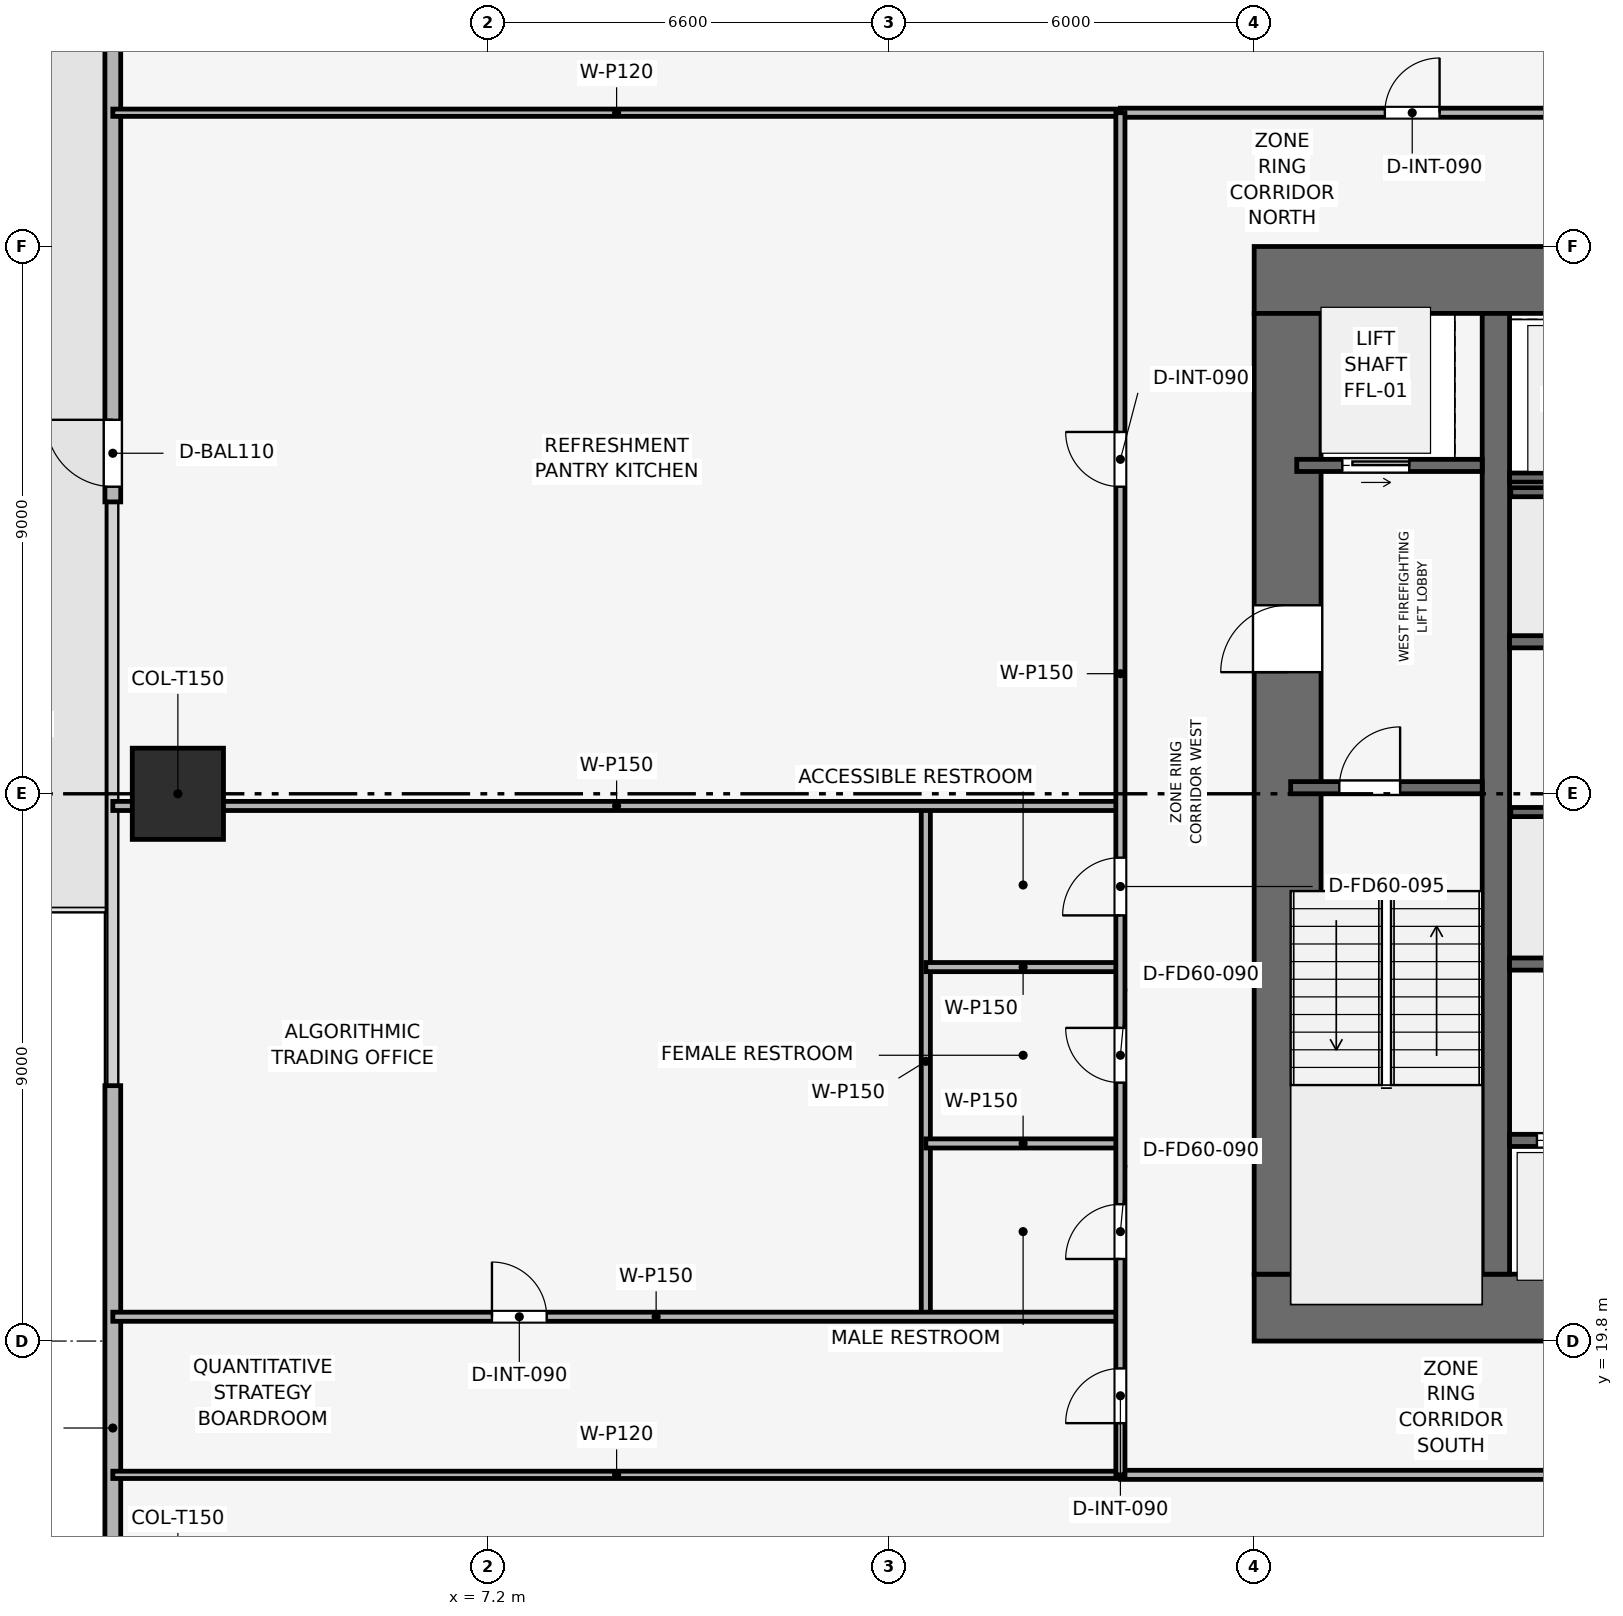
"""IFC4 building model, lengths in metres.
Left out: names, types, materials, properties, quantities, classifications, styles, units other than length and angle.
Written with IfcOpenShell. Run it as: python <this file> out.ifc"""

import sys

from ifc_helpers import new_model, si_unit, direction, frame, frame_2d, origin, origin_2d, place, context, subcontext, project, spatial, rectangle, extrude, element, fill, save


model = new_model("IFC4")
c1 = context("Model", 3, precision=1e-05, world=origin(), true_north=direction((0.0, 1.0)))
c2 = subcontext(c1, "Body", "Model", "MODEL_VIEW")
j1 = project(units=[si_unit("LENGTHUNIT", "METRE"), si_unit("PLANEANGLEUNIT", "RADIAN")], contexts=[c1])
p1 = place(None, origin())
s1 = spatial("IfcSite", under=j1, at=p1, CompositionType="ELEMENT")
p2 = place(p1, origin())
s2 = spatial("IfcBuilding", under=s1, at=p2, CompositionType="ELEMENT")
p3 = place(p2, frame((0.0, 0.0, 30.0)))
s3 = spatial("IfcBuildingStorey", under=s2, at=p3, CompositionType="ELEMENT", Elevation=30.0)
p4 = place(p3, frame((19.8, 20.35, 0.0), z_axis=(0.0, 0.0, 1.0), x_axis=(1.0, 0.0, 0.0)))
e1 = element("IfcWall", 1, at=p4, inside=s3, PredefinedType="SHEAR", context=c2, shape_type="SweptSolid", body=[
    extrude(rectangle(XDim=18.0, YDim=1.1, at=frame_2d((9.0, 0.0))), origin(), (0.0, 0.0, 1.0), 3.9),
])
p5 = place(p4, frame((8.4, 0.0, 0.0)))
e2 = element("IfcOpeningElement", 2, at=p5, cuts=e1, PredefinedType="OPENING", context=c2, shape_type="SweptSolid", body=[
    extrude(rectangle(XDim=1.2, YDim=2.2, at=frame_2d((0.6, 1.1))), frame((0.0, 0.56, 0.0), z_axis=(0.0, -1.0, 0.0), x_axis=(1.0, 0.0, 0.0)), (0.0, 0.0, 1.0), 1.12),
])
p6 = place(p3, frame((19.8, 37.25, 0.0), z_axis=(0.0, 0.0, 1.0), x_axis=(1.0, 0.0, 0.0)))
e3 = element("IfcWall", 3, at=p6, inside=s3, PredefinedType="SHEAR", context=c2, shape_type="SweptSolid", body=[
    extrude(rectangle(XDim=18.0, YDim=1.1, at=frame_2d((9.0, 0.0))), origin(), (0.0, 0.0, 1.0), 3.9),
])
p7 = place(p6, frame((7.05, 0.0, 0.0)))
e4 = element("IfcOpeningElement", 4, at=p7, cuts=e3, PredefinedType="OPENING", context=c2, shape_type="SweptSolid", body=[
    extrude(rectangle(XDim=1.1, YDim=2.15, at=frame_2d((0.55, 1.075))), frame((0.0, 0.56, 0.0), z_axis=(0.0, -1.0, 0.0), x_axis=(1.0, 0.0, 0.0)), (0.0, 0.0, 1.0), 1.12),
])
p8 = place(p3, frame((20.35, 20.9, 0.0), z_axis=(0.0, 0.0, 1.0), x_axis=(0.0, 1.0, 0.0)))
e5 = element("IfcWall", 5, at=p8, inside=s3, PredefinedType="SHEAR", context=c2, shape_type="SweptSolid", body=[
    extrude(rectangle(XDim=15.8, YDim=1.1, at=frame_2d((7.9, 0.0))), origin(), (0.0, 0.0, 1.0), 3.9),
])
p9 = place(p8, frame((9.9, 0.0, 0.0)))
e6 = element("IfcOpeningElement", 6, at=p9, cuts=e5, PredefinedType="OPENING", context=c2, shape_type="SweptSolid", body=[
    extrude(rectangle(XDim=1.1, YDim=2.15, at=frame_2d((0.55, 1.075))), frame((0.0, 0.56, 0.0), z_axis=(0.0, -1.0, 0.0), x_axis=(1.0, 0.0, 0.0)), (0.0, 0.0, 1.0), 1.12),
])
p10 = place(p3, frame((23.775, 20.9, 0.0), z_axis=(0.0, 0.0, 1.0), x_axis=(0.0, 1.0, 0.0)))
e7 = element("IfcWall", 7, at=p10, inside=s3, PredefinedType="SHEAR", context=c2, shape_type="SweptSolid", body=[
    extrude(rectangle(XDim=15.8, YDim=0.45, at=frame_2d((7.9, 0.0))), origin(), (0.0, 0.0, 1.0), 3.9),
])
p11 = place(p3, frame((2.1, 28.8, 0.003), z_axis=(0.0, 0.0, 1.0), x_axis=(1.0, 0.0, 0.0)))
e8 = element("IfcColumn", 8, at=p11, inside=s3, PredefinedType="COLUMN", context=c2, shape_type="SweptSolid", body=[
    extrude(rectangle(XDim=1.5, YDim=1.5, at=origin_2d()), origin(), (0.0, 0.0, 1.0), 3.644),
])
p12 = place(p3, frame((1.03, 8.7, 0.0), z_axis=(0.0, 0.0, 1.0), x_axis=(0.0, 1.0, 0.0)))
e9 = element("IfcWall", 9, at=p12, inside=s3, PredefinedType="SOLIDWALL", context=c2, shape_type="SweptSolid", body=[
    extrude(rectangle(XDim=15.3, YDim=0.26, at=frame_2d((7.65, 0.0))), origin(), (0.0, 0.0, 1.0), 3.65),
])
p13 = place(p12, frame((0.25, 0.0, 0.9)))
e10 = element("IfcOpeningElement", 10, at=p13, cuts=e9, PredefinedType="OPENING", context=c2, shape_type="SweptSolid", body=[
    extrude(rectangle(XDim=3.8, YDim=1.9, at=frame_2d((1.9, 0.95))), frame((0.0, 0.14, 0.0), z_axis=(0.0, -1.0, 0.0), x_axis=(1.0, 0.0, 0.0)), (0.0, 0.0, 1.0), 0.28),
])
p14 = place(p3, frame((1.03, 33.6, 0.0), z_axis=(0.0, 0.0, 1.0), x_axis=(0.0, 1.0, 0.0)))
e11 = element("IfcWall", 11, at=p14, inside=s3, PredefinedType="SOLIDWALL", context=c2, shape_type="SweptSolid", body=[
    extrude(rectangle(XDim=15.3, YDim=0.26, at=frame_2d((7.65, 0.0))), origin(), (0.0, 0.0, 1.0), 3.65),
])
p15 = place(p14, frame((0.25, 0.0, 0.0)))
e12 = element("IfcOpeningElement", 12, at=p15, cuts=e11, PredefinedType="OPENING", context=c2, shape_type="SweptSolid", body=[
    extrude(rectangle(XDim=1.1, YDim=2.2, at=frame_2d((0.55, 1.1))), frame((0.0, 0.14, 0.0), z_axis=(0.0, -1.0, 0.0), x_axis=(1.0, 0.0, 0.0)), (0.0, 0.0, 1.0), 0.28),
])
p16 = place(p3, frame((20.4, 28.9, 0.0), z_axis=(0.0, 0.0, 1.0), x_axis=(1.0, 0.0, 0.0)))
e13 = element("IfcWall", 13, at=p16, inside=s3, PredefinedType="SHEAR", context=c2, shape_type="SweptSolid", body=[
    extrude(rectangle(XDim=3.15, YDim=0.2, at=frame_2d((1.575, 0.0))), origin(), (0.0, 0.0, 1.0), 3.65),
])
p17 = place(p16, frame((0.8, 0.0, 0.0)))
e14 = element("IfcOpeningElement", 14, at=p17, cuts=e13, PredefinedType="OPENING", context=c2, shape_type="SweptSolid", body=[
    extrude(rectangle(XDim=1.0, YDim=2.1, at=frame_2d((0.5, 1.05))), frame((0.0, 0.11, 0.0), z_axis=(0.0, -1.0, 0.0), x_axis=(1.0, 0.0, 0.0)), (0.0, 0.0, 1.0), 0.22),
])
p18 = place(p3, frame((20.5, 34.2, 0.0), z_axis=(0.0, 0.0, 1.0), x_axis=(1.0, 0.0, 0.0)))
e15 = element("IfcWall", 15, at=p18, inside=s3, PredefinedType="SHEAR", context=c2, shape_type="SweptSolid", body=[
    extrude(rectangle(XDim=3.05, YDim=0.2, at=frame_2d((1.525, 0.0))), origin(), (0.0, 0.0, 1.0), 3.65),
])
p19 = place(p18, frame((0.75, 0.0, 0.0)))
e16 = element("IfcOpeningElement", 16, at=p19, cuts=e15, PredefinedType="OPENING", context=c2, shape_type="SweptSolid", body=[
    extrude(rectangle(XDim=1.1, YDim=2.15, at=frame_2d((0.55, 1.075))), frame((0.0, 0.11, 0.0), z_axis=(0.0, -1.0, 0.0), x_axis=(1.0, 0.0, 0.0)), (0.0, 0.0, 1.0), 0.22),
])
p20 = place(p3, frame((24.0, 34.0, 0.0), z_axis=(0.0, 0.0, 1.0), x_axis=(1.0, 0.0, 0.0)))
e17 = element("IfcWall", 17, at=p20, inside=s3, PredefinedType="SHEAR", context=c2, shape_type="SweptSolid", body=[
    extrude(rectangle(XDim=2.48, YDim=0.15, at=frame_2d((1.24, 0.0))), origin(), (0.0, 0.0, 1.0), 3.65),
])
p21 = place(p3, frame((24.0, 23.1, 0.0), z_axis=(0.0, 0.0, 1.0), x_axis=(1.0, 0.0, 0.0)))
e18 = element("IfcWall", 18, at=p21, inside=s3, PredefinedType="SHEAR", context=c2, shape_type="SweptSolid", body=[
    extrude(rectangle(XDim=2.0, YDim=0.2, at=frame_2d((1.0, 0.0))), origin(), (0.0, 0.0, 1.0), 3.65),
])
p22 = place(p21, frame((0.45, 0.0, 0.0)))
e19 = element("IfcOpeningElement", 19, at=p22, cuts=e18, PredefinedType="OPENING", context=c2, shape_type="SweptSolid", body=[
    extrude(rectangle(XDim=1.1, YDim=2.15, at=frame_2d((0.55, 1.075))), frame((0.0, 0.11, 0.0), z_axis=(0.0, -1.0, 0.0), x_axis=(1.0, 0.0, 0.0)), (0.0, 0.0, 1.0), 0.22),
])
for number, where, z_axis, x_axis in (
    (20, (24.0, 26.0, 0.0), (0.0, 0.0, 1.0), (1.0, 0.0, 0.0)),
    (21, (24.0, 31.3, 0.0), (0.0, 0.0, 1.0), (1.0, 0.0, 0.0)),
):
    element("IfcWall", number, at=place(p3, frame(where, z_axis=z_axis, x_axis=x_axis)), inside=s3, PredefinedType="SHEAR", context=c2, shape_type="SweptSolid", body=[
        extrude(rectangle(XDim=2.0, YDim=0.2, at=frame_2d((1.0, 0.0))), origin(), (0.0, 0.0, 1.0), 3.65),
    ])
for number, where, z_axis, x_axis in (
    (22, (24.02, 28.5, 0.0), (0.0, 0.0, 1.0), (1.0, 0.0, 0.0)),
    (23, (24.02, 33.76, 0.0), (0.0, 0.0, 1.0), (1.0, 0.0, 0.0)),
):
    element("IfcWall", number, at=place(p3, frame(where, z_axis=z_axis, x_axis=x_axis)), inside=s3, PredefinedType="SHEAR", context=c2, shape_type="SweptSolid", body=[
        extrude(rectangle(XDim=4.08, YDim=0.15, at=frame_2d((2.04, 0.0))), origin(), (0.0, 0.0, 1.0), 3.65),
    ])
for number, where, z_axis, x_axis in (
    (24, (1.03, 17.6, 0.0), (0.0, 0.0, 1.0), (1.0, 0.0, 0.0)),
    (25, (1.03, 40.0, 0.0), (0.0, 0.0, 1.0), (1.0, 0.0, 0.0)),
):
    element("IfcWall", number, at=place(p3, frame(where, z_axis=z_axis, x_axis=x_axis)), inside=s3, PredefinedType="PARTITIONING", context=c2, shape_type="SweptSolid", body=[
        extrude(rectangle(XDim=16.57, YDim=0.12, at=frame_2d((8.285, 0.0))), origin(), (0.0, 0.0, 1.0), 2.935),
    ])
p23 = place(p3, frame((14.4, 20.2, 0.0), z_axis=(0.0, 0.0, 1.0), x_axis=(0.0, 1.0, 0.0)))
e26 = element("IfcWall", 26, at=p23, inside=s3, PredefinedType="PARTITIONING", context=c2, shape_type="SweptSolid", body=[
    extrude(rectangle(XDim=8.4, YDim=0.15, at=frame_2d((4.2, 0.0))), origin(), (0.0, 0.0, 1.0), 3.085),
])
p24 = place(p3, frame((1.03, 20.2, 0.0), z_axis=(0.0, 0.0, 1.0), x_axis=(1.0, 0.0, 0.0)))
e27 = element("IfcWall", 27, at=p24, inside=s3, PredefinedType="PARTITIONING", context=c2, shape_type="SweptSolid", body=[
    extrude(rectangle(XDim=16.57, YDim=0.15, at=frame_2d((8.285, 0.0))), origin(), (0.0, 0.0, 1.0), 2.935),
])
p25 = place(p24, frame((6.235, 0.0, 0.0)))
e28 = element("IfcOpeningElement", 28, at=p25, cuts=e27, PredefinedType="OPENING", context=c2, shape_type="SweptSolid", body=[
    extrude(rectangle(XDim=0.9, YDim=2.1, at=frame_2d((0.45, 1.05))), frame((0.0, 0.085, 0.0), z_axis=(0.0, -1.0, 0.0), x_axis=(1.0, 0.0, 0.0)), (0.0, 0.0, 1.0), 0.17),
])
p26 = place(p3, frame((1.03, 28.6, 0.0), z_axis=(0.0, 0.0, 1.0), x_axis=(1.0, 0.0, 0.0)))
e29 = element("IfcWall", 29, at=p26, inside=s3, PredefinedType="PARTITIONING", context=c2, shape_type="SweptSolid", body=[
    extrude(rectangle(XDim=16.57, YDim=0.15, at=frame_2d((8.285, 0.0))), origin(), (0.0, 0.0, 1.0), 2.935),
])
for number, where, z_axis, x_axis in (
    (30, (14.4, 23.05, 0.0), (0.0, 0.0, 1.0), (1.0, 0.0, 0.0)),
    (31, (14.4, 25.95, 0.0), (0.0, 0.0, 1.0), (1.0, 0.0, 0.0)),
):
    element("IfcWall", number, at=place(p3, frame(where, z_axis=z_axis, x_axis=x_axis)), inside=s3, PredefinedType="PARTITIONING", context=c2, shape_type="SweptSolid", body=[
        extrude(rectangle(XDim=3.2, YDim=0.15, at=frame_2d((1.6, 0.0))), origin(), (0.0, 0.0, 1.0), 3.65),
    ])
p27 = place(p3, frame((17.6, 17.6, 0.0), z_axis=(0.0, 0.0, 1.0), x_axis=(1.0, 0.0, 0.0)))
e32 = element("IfcWall", 32, at=p27, inside=s3, PredefinedType="PARTITIONING", context=c2, shape_type="SweptSolid", body=[
    extrude(rectangle(XDim=22.4, YDim=0.15, at=frame_2d((11.2, 0.0))), origin(), (0.0, 0.0, 1.0), 3.085),
])
p28 = place(p27, frame((10.75, 0.0, 0.0)))
e33 = element("IfcOpeningElement", 33, at=p28, cuts=e32, PredefinedType="OPENING", context=c2, shape_type="SweptSolid", body=[
    extrude(rectangle(XDim=0.9, YDim=2.1, at=frame_2d((0.45, 1.05))), frame((0.0, 0.085, 0.0), z_axis=(0.0, -1.0, 0.0), x_axis=(1.0, 0.0, 0.0)), (0.0, 0.0, 1.0), 0.17),
])
p29 = place(p3, frame((17.6, 40.0, 0.0), z_axis=(0.0, 0.0, 1.0), x_axis=(1.0, 0.0, 0.0)))
e34 = element("IfcWall", 34, at=p29, inside=s3, PredefinedType="PARTITIONING", context=c2, shape_type="SweptSolid", body=[
    extrude(rectangle(XDim=22.4, YDim=0.15, at=frame_2d((11.2, 0.0))), origin(), (0.0, 0.0, 1.0), 3.085),
])
p30 = place(p29, frame((4.349, 0.0, 0.0)))
e35 = element("IfcOpeningElement", 35, at=p30, cuts=e34, PredefinedType="OPENING", context=c2, shape_type="SweptSolid", body=[
    extrude(rectangle(XDim=0.9, YDim=2.1, at=frame_2d((0.45, 1.05))), frame((0.0, 0.085, 0.0), z_axis=(0.0, -1.0, 0.0), x_axis=(1.0, 0.0, 0.0)), (0.0, 0.0, 1.0), 0.17),
])
p31 = place(p29, frame((15.549, 0.0, 0.0)))
e36 = element("IfcOpeningElement", 36, at=p31, cuts=e34, PredefinedType="OPENING", context=c2, shape_type="SweptSolid", body=[
    extrude(rectangle(XDim=0.9, YDim=2.1, at=frame_2d((0.45, 1.05))), frame((0.0, 0.085, 0.0), z_axis=(0.0, -1.0, 0.0), x_axis=(1.0, 0.0, 0.0)), (0.0, 0.0, 1.0), 0.17),
])
p32 = place(p3, frame((17.6, 17.6, 0.0), z_axis=(0.0, 0.0, 1.0), x_axis=(0.0, 1.0, 0.0)))
e37 = element("IfcWall", 37, at=p32, inside=s3, PredefinedType="PARTITIONING", context=c2, shape_type="SweptSolid", body=[
    extrude(rectangle(XDim=22.4, YDim=0.15, at=frame_2d((11.2, 0.0))), origin(), (0.0, 0.0, 1.0), 3.085),
])
p33 = place(p32, frame((0.85, 0.0, 0.0)))
e38 = element("IfcOpeningElement", 38, at=p33, cuts=e37, PredefinedType="OPENING", context=c2, shape_type="SweptSolid", body=[
    extrude(rectangle(XDim=0.9, YDim=2.1, at=frame_2d((0.45, 1.05))), frame((0.0, 0.085, 0.0), z_axis=(0.0, -1.0, 0.0), x_axis=(1.0, 0.0, 0.0)), (0.0, 0.0, 1.0), 0.17),
])
p34 = place(p32, frame((3.55, 0.0, 0.0)))
e39 = element("IfcOpeningElement", 39, at=p34, cuts=e37, PredefinedType="OPENING", context=c2, shape_type="SweptSolid", body=[
    extrude(rectangle(XDim=0.9, YDim=2.1, at=frame_2d((0.45, 1.05))), frame((0.0, 0.085, 0.0), z_axis=(0.0, -1.0, 0.0), x_axis=(1.0, 0.0, 0.0)), (0.0, 0.0, 1.0), 0.17),
])
p35 = place(p32, frame((6.45, 0.0, 0.0)))
e40 = element("IfcOpeningElement", 40, at=p35, cuts=e37, PredefinedType="OPENING", context=c2, shape_type="SweptSolid", body=[
    extrude(rectangle(XDim=0.9, YDim=2.1, at=frame_2d((0.45, 1.05))), frame((0.0, 0.085, 0.0), z_axis=(0.0, -1.0, 0.0), x_axis=(1.0, 0.0, 0.0)), (0.0, 0.0, 1.0), 0.17),
])
p36 = place(p32, frame((9.2, 0.0, 0.0)))
e41 = element("IfcOpeningElement", 41, at=p36, cuts=e37, PredefinedType="OPENING", context=c2, shape_type="SweptSolid", body=[
    extrude(rectangle(XDim=0.95, YDim=2.1, at=frame_2d((0.475, 1.05))), frame((0.0, 0.085, 0.0), z_axis=(0.0, -1.0, 0.0), x_axis=(1.0, 0.0, 0.0)), (0.0, 0.0, 1.0), 0.17),
])
p37 = place(p32, frame((16.25, 0.0, 0.0)))
e42 = element("IfcOpeningElement", 42, at=p37, cuts=e37, PredefinedType="OPENING", context=c2, shape_type="SweptSolid", body=[
    extrude(rectangle(XDim=0.9, YDim=2.1, at=frame_2d((0.45, 1.05))), frame((0.0, 0.085, 0.0), z_axis=(0.0, -1.0, 0.0), x_axis=(1.0, 0.0, 0.0)), (0.0, 0.0, 1.0), 0.17),
])
p38 = place(p15, origin())
e43 = element("IfcDoor", 43, at=p38, inside=s3, OperationType="SINGLE_SWING_RIGHT", PredefinedType="DOOR", context=c2, shape_type="SweptSolid", body=[
    extrude(rectangle(XDim=1.1, YDim=2.2, at=frame_2d((0.55, 1.1))), frame((0.0, 0.025, 0.0), z_axis=(0.0, -1.0, 0.0), x_axis=(1.0, 0.0, 0.0)), (0.0, 0.0, 1.0), 0.05),
])
fill(e12, e43)
p39 = place(p17, origin())
e44 = element("IfcDoor", 44, at=p39, inside=s3, OperationType="SINGLE_SWING_RIGHT", PredefinedType="DOOR", context=c2, shape_type="SweptSolid", body=[
    extrude(rectangle(XDim=1.0, YDim=2.1, at=frame_2d((0.5, 1.05))), frame((0.0, 0.025, 0.0), z_axis=(0.0, -1.0, 0.0), x_axis=(1.0, 0.0, 0.0)), (0.0, 0.0, 1.0), 0.05),
])
fill(e14, e44)
p40 = place(p19, origin())
e45 = element("IfcDoor", 45, at=p40, inside=s3, OperationType="SLIDING_TO_RIGHT", PredefinedType="DOOR", context=c2, shape_type="SweptSolid", body=[
    extrude(rectangle(XDim=1.1, YDim=2.15, at=frame_2d((0.55, 1.075))), frame((0.0, 0.025, 0.0), z_axis=(0.0, -1.0, 0.0), x_axis=(1.0, 0.0, 0.0)), (0.0, 0.0, 1.0), 0.05),
])
fill(e16, e45)
p41 = place(p22, origin())
e46 = element("IfcDoor", 46, at=p41, inside=s3, OperationType="SLIDING_TO_RIGHT", PredefinedType="DOOR", context=c2, shape_type="SweptSolid", body=[
    extrude(rectangle(XDim=1.1, YDim=2.15, at=frame_2d((0.55, 1.075))), frame((0.0, 0.025, 0.0), z_axis=(0.0, -1.0, 0.0), x_axis=(1.0, 0.0, 0.0)), (0.0, 0.0, 1.0), 0.05),
])
fill(e19, e46)
p42 = place(p25, origin())
e47 = element("IfcDoor", 47, at=p42, inside=s3, OperationType="SINGLE_SWING_LEFT", PredefinedType="DOOR", context=c2, shape_type="SweptSolid", body=[
    extrude(rectangle(XDim=0.9, YDim=2.1, at=frame_2d((0.45, 1.05))), frame((0.0, 0.025, 0.0), z_axis=(0.0, -1.0, 0.0), x_axis=(1.0, 0.0, 0.0)), (0.0, 0.0, 1.0), 0.05),
])
fill(e28, e47)
p43 = place(p30, origin())
e48 = element("IfcDoor", 48, at=p43, inside=s3, OperationType="SINGLE_SWING_RIGHT", PredefinedType="DOOR", context=c2, shape_type="SweptSolid", body=[
    extrude(rectangle(XDim=0.9, YDim=2.1, at=frame_2d((0.45, 1.05))), frame((0.0, 0.025, 0.0), z_axis=(0.0, -1.0, 0.0), x_axis=(1.0, 0.0, 0.0)), (0.0, 0.0, 1.0), 0.05),
])
fill(e35, e48)
p44 = place(p33, origin())
e49 = element("IfcDoor", 49, at=p44, inside=s3, OperationType="SINGLE_SWING_LEFT", PredefinedType="DOOR", context=c2, shape_type="SweptSolid", body=[
    extrude(rectangle(XDim=0.9, YDim=2.1, at=frame_2d((0.45, 1.05))), frame((0.0, 0.025, 0.0), z_axis=(0.0, -1.0, 0.0), x_axis=(1.0, 0.0, 0.0)), (0.0, 0.0, 1.0), 0.05),
])
fill(e38, e49)
p45 = place(p34, origin())
e50 = element("IfcDoor", 50, at=p45, inside=s3, OperationType="SINGLE_SWING_LEFT", PredefinedType="DOOR", context=c2, shape_type="SweptSolid", body=[
    extrude(rectangle(XDim=0.9, YDim=2.1, at=frame_2d((0.45, 1.05))), frame((0.0, 0.025, 0.0), z_axis=(0.0, -1.0, 0.0), x_axis=(1.0, 0.0, 0.0)), (0.0, 0.0, 1.0), 0.05),
])
fill(e39, e50)
p46 = place(p35, origin())
e51 = element("IfcDoor", 51, at=p46, inside=s3, OperationType="SINGLE_SWING_RIGHT", PredefinedType="DOOR", context=c2, shape_type="SweptSolid", body=[
    extrude(rectangle(XDim=0.9, YDim=2.1, at=frame_2d((0.45, 1.05))), frame((0.0, 0.025, 0.0), z_axis=(0.0, -1.0, 0.0), x_axis=(1.0, 0.0, 0.0)), (0.0, 0.0, 1.0), 0.05),
])
fill(e40, e51)
p47 = place(p36, origin())
e52 = element("IfcDoor", 52, at=p47, inside=s3, OperationType="SINGLE_SWING_LEFT", PredefinedType="DOOR", context=c2, shape_type="SweptSolid", body=[
    extrude(rectangle(XDim=0.95, YDim=2.1, at=frame_2d((0.475, 1.05))), frame((0.0, 0.025, 0.0), z_axis=(0.0, -1.0, 0.0), x_axis=(1.0, 0.0, 0.0)), (0.0, 0.0, 1.0), 0.05),
])
fill(e41, e52)
p48 = place(p37, origin())
e53 = element("IfcDoor", 53, at=p48, inside=s3, OperationType="SINGLE_SWING_RIGHT", PredefinedType="DOOR", context=c2, shape_type="SweptSolid", body=[
    extrude(rectangle(XDim=0.9, YDim=2.1, at=frame_2d((0.45, 1.05))), frame((0.0, 0.025, 0.0), z_axis=(0.0, -1.0, 0.0), x_axis=(1.0, 0.0, 0.0)), (0.0, 0.0, 1.0), 0.05),
])
fill(e42, e53)
p49 = place(p9, origin())
e54 = element("IfcDoor", 54, at=p49, inside=s3, OperationType="SINGLE_SWING_LEFT", PredefinedType="DOOR", context=c2, shape_type="SweptSolid", body=[
    extrude(rectangle(XDim=1.1, YDim=2.15, at=frame_2d((0.55, 1.075))), frame((0.0, 0.025, 0.0), z_axis=(0.0, -1.0, 0.0), x_axis=(1.0, 0.0, 0.0)), (0.0, 0.0, 1.0), 0.05),
])
fill(e6, e54)
save(model, sys.argv[1])
